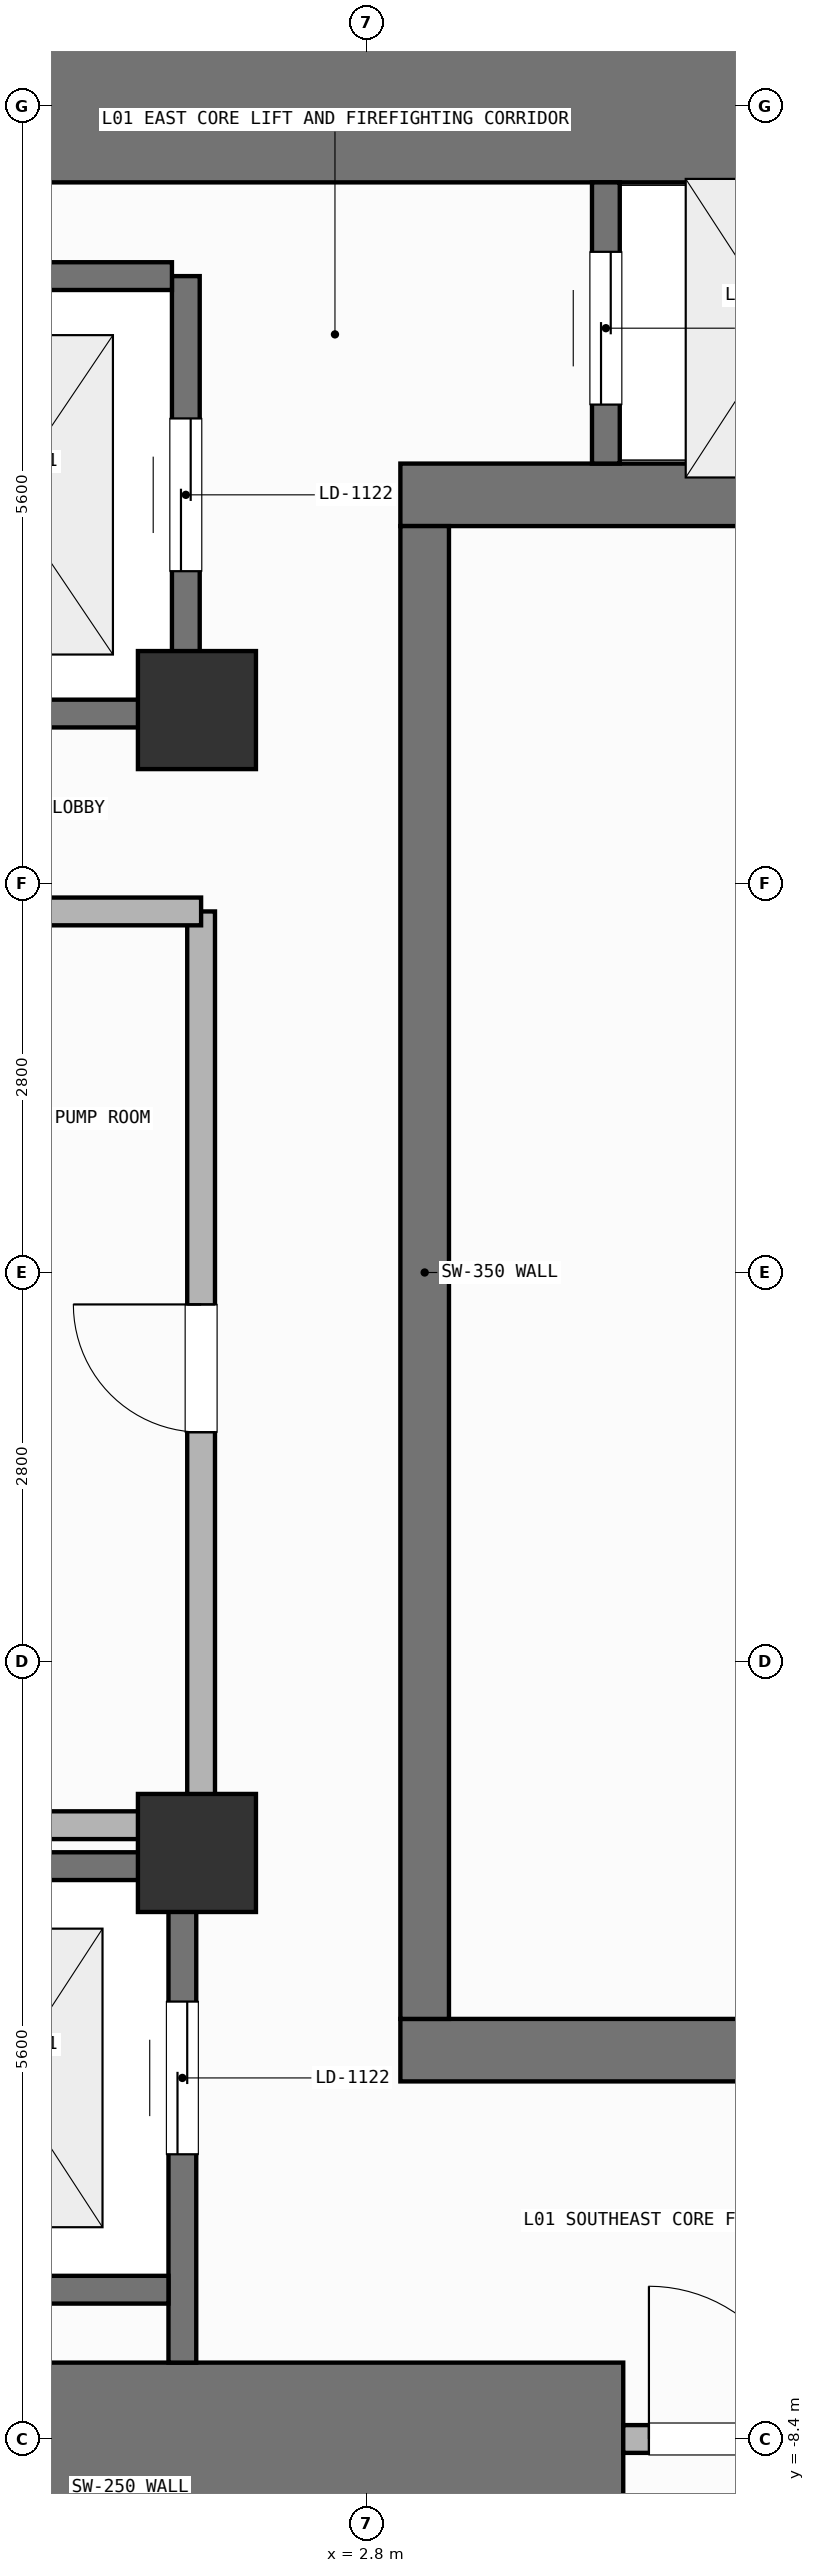
"""IFC4 building model, lengths in metres.
Left out: names, types, materials, properties, quantities, classifications, styles, units other than length and angle.
Written with IfcOpenShell. Run it as: python <this file> out.ifc"""

import sys

from ifc_helpers import new_model, si_unit, direction, frame, frame_2d, origin, origin_2d, place, context, subcontext, project, spatial, rectangle, extrude, element, fill, save


model = new_model("IFC4")
c1 = context("Model", 3, precision=1e-05, world=origin(), true_north=direction((0.0, 1.0)))
c2 = subcontext(c1, "Body", "Model", "MODEL_VIEW")
j1 = project(units=[si_unit("LENGTHUNIT", "METRE"), si_unit("PLANEANGLEUNIT", "RADIAN")], contexts=[c1])
p1 = place(None, origin())
s1 = spatial("IfcSite", under=j1, at=p1, CompositionType="ELEMENT")
p2 = place(p1, origin())
s2 = spatial("IfcBuilding", under=s1, at=p2, CompositionType="ELEMENT")
p3 = place(p2, origin())
s3 = spatial("IfcBuildingStorey", under=s2, at=p3, CompositionType="ELEMENT", Elevation=0.0)
p4 = place(p3, frame((-2.62, -8.4, 0.0), z_axis=(0.0, 0.0, 1.0), x_axis=(1.0, 0.0, 0.0)))
e1 = element("IfcWall", 1, at=p4, inside=s3, PredefinedType="SHEAR", context=c2, shape_type="SweptSolid", body=[
    extrude(rectangle(XDim=7.27, YDim=1.1, at=frame_2d((3.635, 0.0))), origin(), (0.0, 0.0, 1.0), 4.8),
])
p5 = place(p3, frame((-7.55, 8.4, 0.0), z_axis=(0.0, 0.0, 1.0), x_axis=(1.0, 0.0, 0.0)))
e2 = element("IfcWall", 2, at=p5, inside=s3, PredefinedType="SHEAR", context=c2, shape_type="SweptSolid", body=[
    extrude(rectangle(XDim=16.5, YDim=1.1, at=frame_2d((8.25, 0.0))), origin(), (0.0, 0.0, 1.0), 4.8),
])
for number, where, z_axis, x_axis in (
    (3, (3.045, -5.6, 0.0), (0.0, 0.0, 1.0), (1.0, 0.0, 0.0)),
    (4, (3.045, 5.6, 0.0), (0.0, 0.0, 1.0), (1.0, 0.0, 0.0)),
):
    element("IfcWall", number, at=place(p3, frame(where, z_axis=z_axis, x_axis=x_axis)), inside=s3, PredefinedType="SHEAR", context=c2, shape_type="SweptSolid", body=[
        extrude(rectangle(XDim=5.905, YDim=0.45, at=frame_2d((2.953, 0.0))), origin(), (0.0, 0.0, 1.0), 4.8),
    ])
p6 = place(p3, frame((3.22, -5.375, 0.0), z_axis=(0.0, 0.0, 1.0), x_axis=(0.0, 1.0, 0.0)))
e5 = element("IfcWall", 5, at=p6, inside=s3, PredefinedType="SHEAR", context=c2, shape_type="SweptSolid", body=[
    extrude(rectangle(XDim=10.75, YDim=0.35, at=frame_2d((5.375, 0.0))), origin(), (0.0, 0.0, 1.0), 4.8),
])
for number, where, z_axis, x_axis in (
    (6, (1.58, -4.18, 0.0), (0.0, 0.0, 1.0), (1.0, 0.0, 0.0)),
    (7, (1.58, 4.05, 0.0), (0.0, 0.0, 1.0), (1.0, 0.0, 0.0)),
):
    element("IfcColumn", number, at=place(p3, frame(where, z_axis=z_axis, x_axis=x_axis)), inside=s3, PredefinedType="COLUMN", context=c2, shape_type="SweptSolid", body=[
        extrude(rectangle(XDim=0.85, YDim=0.85, at=origin_2d()), origin(), (0.0, 0.0, 1.0), 4.8),
    ])
p7 = place(p3, frame((1.5, 4.025, 0.0), z_axis=(0.0, 0.0, 1.0), x_axis=(0.0, 1.0, 0.0)))
e8 = element("IfcWall", 8, at=p7, inside=s3, PredefinedType="SHEAR", context=c2, shape_type="SweptSolid", body=[
    extrude(rectangle(XDim=3.15, YDim=0.2, at=frame_2d((1.575, 0.0))), origin(), (0.0, 0.0, 1.0), 4.56),
])
p8 = place(p7, frame((1.025, 0.0, 0.0)))
e9 = element("IfcOpeningElement", 9, at=p8, cuts=e8, PredefinedType="OPENING", context=c2, shape_type="SweptSolid", body=[
    extrude(rectangle(XDim=1.1, YDim=2.2, at=frame_2d((0.55, 1.1))), frame((0.0, 0.11, 0.0), z_axis=(0.0, -1.0, 0.0), x_axis=(1.0, 0.0, 0.0)), (0.0, 0.0, 1.0), 0.22),
])
for number, where, z_axis, x_axis in (
    (10, (-1.0, 4.025, 0.0), (0.0, 0.0, 1.0), (1.0, 0.0, 0.0)),
    (11, (-1.0, 7.175, 0.0), (0.0, 0.0, 1.0), (1.0, 0.0, 0.0)),
):
    element("IfcWall", number, at=place(p3, frame(where, z_axis=z_axis, x_axis=x_axis)), inside=s3, PredefinedType="SHEAR", context=c2, shape_type="SweptSolid", body=[
        extrude(rectangle(XDim=2.4, YDim=0.2, at=frame_2d((1.2, 0.0))), origin(), (0.0, 0.0, 1.0), 4.56),
    ])
p9 = place(p3, frame((1.475, -7.85, 0.0), z_axis=(0.0, 0.0, 1.0), x_axis=(0.0, 1.0, 0.0)))
e12 = element("IfcWall", 12, at=p9, inside=s3, PredefinedType="SHEAR", context=c2, shape_type="SweptSolid", body=[
    extrude(rectangle(XDim=3.575, YDim=0.2, at=frame_2d((1.788, 0.0))), origin(), (0.0, 0.0, 1.0), 4.56),
])
p10 = place(p9, frame((1.5, 0.0, 0.0)))
e13 = element("IfcOpeningElement", 13, at=p10, cuts=e12, PredefinedType="OPENING", context=c2, shape_type="SweptSolid", body=[
    extrude(rectangle(XDim=1.1, YDim=2.2, at=frame_2d((0.55, 1.1))), frame((0.0, 0.11, 0.0), z_axis=(0.0, -1.0, 0.0), x_axis=(1.0, 0.0, 0.0)), (0.0, 0.0, 1.0), 0.22),
])
for number, where, z_axis, x_axis in (
    (14, (-0.975, -7.325, 0.0), (0.0, 0.0, 1.0), (1.0, 0.0, 0.0)),
    (15, (-0.975, -4.275, 0.0), (0.0, 0.0, 1.0), (1.0, 0.0, 0.0)),
):
    element("IfcWall", number, at=place(p3, frame(where, z_axis=z_axis, x_axis=x_axis)), inside=s3, PredefinedType="SHEAR", context=c2, shape_type="SweptSolid", body=[
        extrude(rectangle(XDim=2.35, YDim=0.2, at=frame_2d((1.175, 0.0))), origin(), (0.0, 0.0, 1.0), 4.56),
    ])
p11 = place(p3, frame((4.525, 5.825, 0.0), z_axis=(0.0, 0.0, 1.0), x_axis=(0.0, 1.0, 0.0)))
e16 = element("IfcWall", 16, at=p11, inside=s3, PredefinedType="SHEAR", context=c2, shape_type="SweptSolid", body=[
    extrude(rectangle(XDim=2.025, YDim=0.2, at=frame_2d((1.013, 0.0))), origin(), (0.0, 0.0, 1.0), 4.56),
])
p12 = place(p11, frame((0.425, 0.0, 0.0)))
e17 = element("IfcOpeningElement", 17, at=p12, cuts=e16, PredefinedType="OPENING", context=c2, shape_type="SweptSolid", body=[
    extrude(rectangle(XDim=1.1, YDim=2.2, at=frame_2d((0.55, 1.1))), frame((0.0, 0.11, 0.0), z_axis=(0.0, -1.0, 0.0), x_axis=(1.0, 0.0, 0.0)), (0.0, 0.0, 1.0), 0.22),
])
p13 = place(p3, frame((4.65, -8.4, 0.0), z_axis=(0.0, 0.0, 1.0), x_axis=(1.0, 0.0, 0.0)))
e18 = element("IfcWall", 18, at=p13, inside=s3, PredefinedType="SOLIDWALL", context=c2, shape_type="SweptSolid", body=[
    extrude(rectangle(XDim=1.47, YDim=0.2, at=frame_2d((0.735, 0.0))), origin(), (0.0, 0.0, 1.0), 3.6),
])
p14 = place(p13, frame((0.185, 0.0, 0.0)))
e19 = element("IfcOpeningElement", 19, at=p14, cuts=e18, PredefinedType="OPENING", context=c2, shape_type="SweptSolid", body=[
    extrude(rectangle(XDim=1.1, YDim=2.15, at=frame_2d((0.55, 1.075))), frame((0.0, 0.11, 0.0), z_axis=(0.0, -1.0, 0.0), x_axis=(1.0, 0.0, 0.0)), (0.0, 0.0, 1.0), 0.22),
])
p15 = place(p3, frame((1.61, -3.98, 0.0), z_axis=(0.0, 0.0, 1.0), x_axis=(0.0, 1.0, 0.0)))
e20 = element("IfcWall", 20, at=p15, inside=s3, PredefinedType="SOLIDWALL", context=c2, shape_type="SweptSolid", body=[
    extrude(rectangle(XDim=6.58, YDim=0.2, at=frame_2d((3.29, 0.0))), origin(), (0.0, 0.0, 1.0), 4.56),
])
p16 = place(p15, frame((2.83, 0.0, 0.0)))
e21 = element("IfcOpeningElement", 21, at=p16, cuts=e20, PredefinedType="OPENING", context=c2, shape_type="SweptSolid", body=[
    extrude(rectangle(XDim=0.92, YDim=2.1, at=frame_2d((0.46, 1.05))), frame((0.0, 0.11, 0.0), z_axis=(0.0, -1.0, 0.0), x_axis=(1.0, 0.0, 0.0)), (0.0, 0.0, 1.0), 0.22),
])
for number, where, z_axis, x_axis in (
    (22, (-1.58, -3.98, 0.0), (0.0, 0.0, 1.0), (1.0, 0.0, 0.0)),
    (23, (-1.58, 2.6, 0.0), (0.0, 0.0, 1.0), (1.0, 0.0, 0.0)),
):
    element("IfcWall", number, at=place(p3, frame(where, z_axis=z_axis, x_axis=x_axis)), inside=s3, PredefinedType="SOLIDWALL", context=c2, shape_type="SweptSolid", body=[
        extrude(rectangle(XDim=3.19, YDim=0.2, at=frame_2d((1.595, 0.0))), origin(), (0.0, 0.0, 1.0), 4.56),
    ])
p17 = place(p8, origin())
e24 = element("IfcDoor", 24, at=p17, inside=s3, OperationType="SLIDING_TO_LEFT", PredefinedType="DOOR", context=c2, shape_type="SweptSolid", body=[
    extrude(rectangle(XDim=1.1, YDim=2.2, at=frame_2d((0.55, 1.1))), frame((0.0, 0.025, 0.0), z_axis=(0.0, -1.0, 0.0), x_axis=(1.0, 0.0, 0.0)), (0.0, 0.0, 1.0), 0.05),
])
fill(e9, e24)
p18 = place(p10, origin())
e25 = element("IfcDoor", 25, at=p18, inside=s3, OperationType="SLIDING_TO_LEFT", PredefinedType="DOOR", context=c2, shape_type="SweptSolid", body=[
    extrude(rectangle(XDim=1.1, YDim=2.2, at=frame_2d((0.55, 1.1))), frame((0.0, 0.025, 0.0), z_axis=(0.0, -1.0, 0.0), x_axis=(1.0, 0.0, 0.0)), (0.0, 0.0, 1.0), 0.05),
])
fill(e13, e25)
p19 = place(p12, origin())
e26 = element("IfcDoor", 26, at=p19, inside=s3, OperationType="SLIDING_TO_LEFT", PredefinedType="DOOR", context=c2, shape_type="SweptSolid", body=[
    extrude(rectangle(XDim=1.1, YDim=2.2, at=frame_2d((0.55, 1.1))), frame((0.0, 0.025, 0.0), z_axis=(0.0, -1.0, 0.0), x_axis=(1.0, 0.0, 0.0)), (0.0, 0.0, 1.0), 0.05),
])
fill(e17, e26)
p20 = place(p14, origin())
e27 = element("IfcDoor", 27, at=p20, inside=s3, OperationType="SINGLE_SWING_LEFT", PredefinedType="DOOR", context=c2, shape_type="SweptSolid", body=[
    extrude(rectangle(XDim=1.1, YDim=2.15, at=frame_2d((0.55, 1.075))), frame((0.0, 0.025, 0.0), z_axis=(0.0, -1.0, 0.0), x_axis=(1.0, 0.0, 0.0)), (0.0, 0.0, 1.0), 0.05),
])
fill(e19, e27)
p21 = place(p16, origin())
e28 = element("IfcDoor", 28, at=p21, inside=s3, OperationType="SINGLE_SWING_RIGHT", PredefinedType="DOOR", context=c2, shape_type="SweptSolid", body=[
    extrude(rectangle(XDim=0.92, YDim=2.1, at=frame_2d((0.46, 1.05))), frame((0.0, 0.025, 0.0), z_axis=(0.0, -1.0, 0.0), x_axis=(1.0, 0.0, 0.0)), (0.0, 0.0, 1.0), 0.05),
])
fill(e21, e28)
save(model, sys.argv[1])
